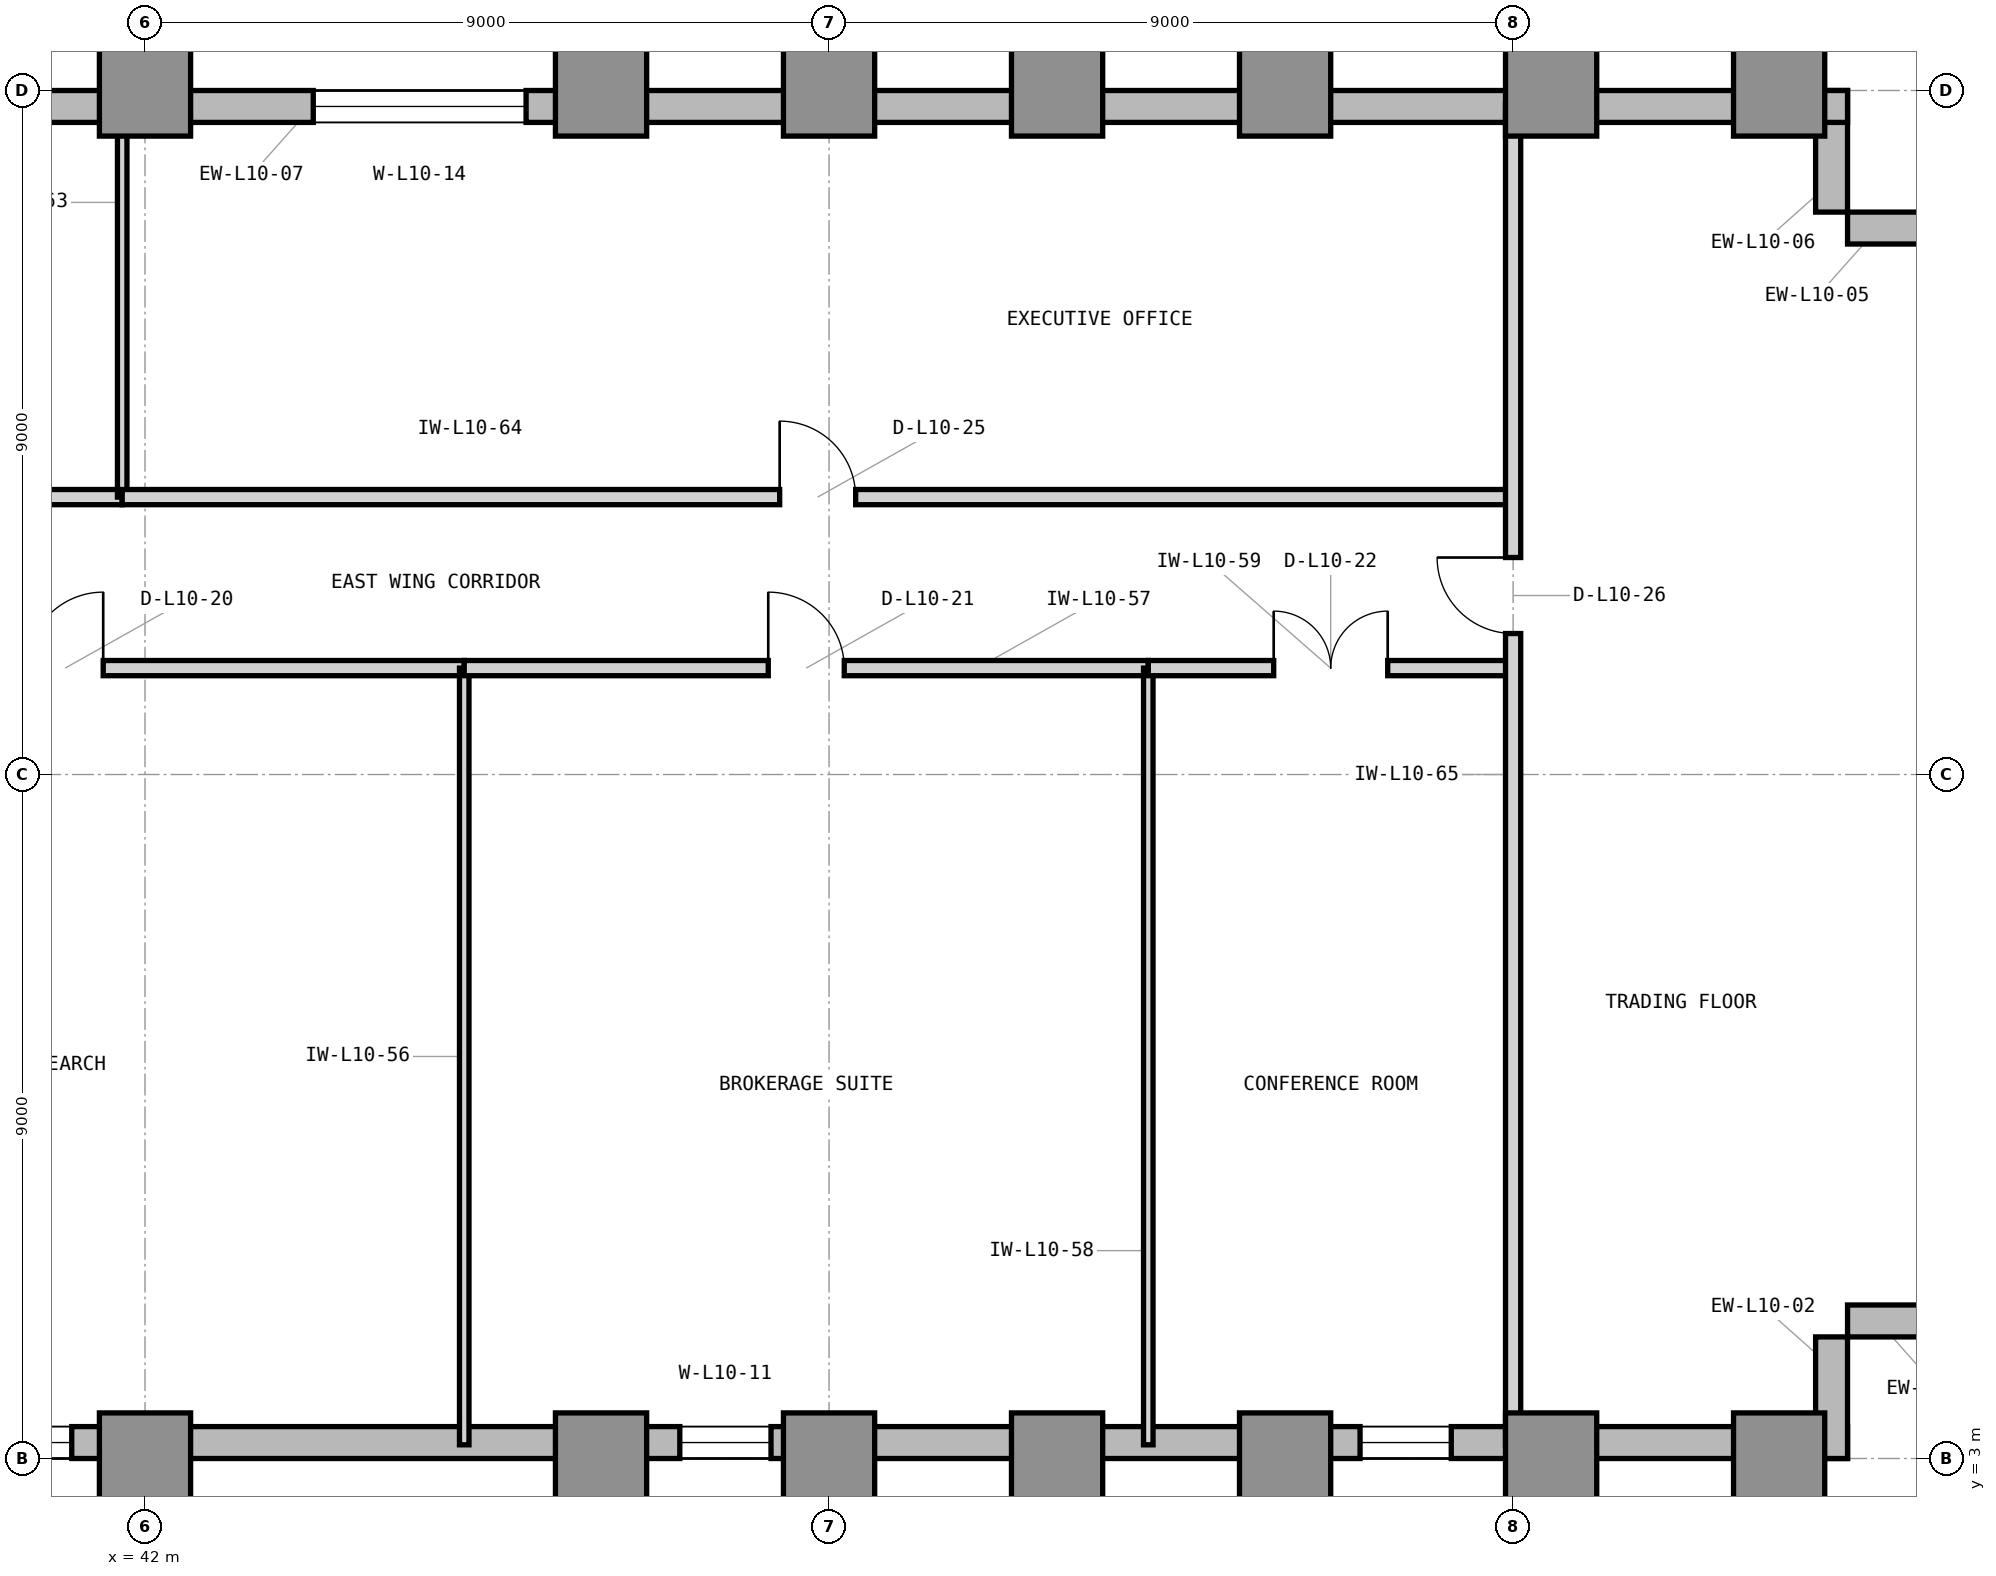
"""IFC4 building model, lengths in metres.
Left out: names, types, materials, properties, quantities, classifications, styles, units other than length and angle.
Written with IfcOpenShell. Run it as: python <this file> out.ifc"""

import sys

from ifc_helpers import new_model, si_unit, direction, frame, frame_2d, origin, origin_2d, place, context, subcontext, project, spatial, rectangle, extrude, element, fill, save


model = new_model("IFC4")
c1 = context("Model", 3, precision=1e-05, world=origin(), true_north=direction((0.0, 1.0)))
c2 = subcontext(c1, "Body", "Model", "MODEL_VIEW")
j1 = project(units=[si_unit("LENGTHUNIT", "METRE"), si_unit("PLANEANGLEUNIT", "RADIAN")], contexts=[c1])
p1 = place(None, origin())
s1 = spatial("IfcSite", under=j1, at=p1, CompositionType="ELEMENT")
p2 = place(p1, origin())
s2 = spatial("IfcBuilding", under=s1, at=p2, CompositionType="ELEMENT")
p3 = place(p2, frame((0.0, 0.0, 46.8)))
s3 = spatial("IfcBuildingStorey", under=s2, at=p3, CompositionType="ELEMENT", Elevation=46.8)
for number, where, z_axis, x_axis in (
    (1, (42.0, 3.0, 0.0), (0.0, 0.0, 1.0), (1.0, 0.0, 0.0)),
    (2, (42.0, 21.0, 0.0), (0.0, 0.0, 1.0), (1.0, 0.0, 0.0)),
    (3, (48.0, 3.0, 0.0), (0.0, 0.0, 1.0), (1.0, 0.0, 0.0)),
    (4, (48.0, 21.0, 0.0), (0.0, 0.0, 1.0), (1.0, 0.0, 0.0)),
    (5, (51.0, 3.0, 0.0), (0.0, 0.0, 1.0), (1.0, 0.0, 0.0)),
    (6, (51.0, 21.0, 0.0), (0.0, 0.0, 1.0), (1.0, 0.0, 0.0)),
    (7, (54.0, 3.0, 0.0), (0.0, 0.0, 1.0), (1.0, 0.0, 0.0)),
    (8, (54.0, 21.0, 0.0), (0.0, 0.0, 1.0), (1.0, 0.0, 0.0)),
    (9, (57.0, 3.0, 0.0), (0.0, 0.0, 1.0), (1.0, 0.0, 0.0)),
    (10, (57.0, 21.0, 0.0), (0.0, 0.0, 1.0), (1.0, 0.0, 0.0)),
    (11, (60.5, 3.0, 0.0), (0.0, 0.0, 1.0), (1.0, 0.0, 0.0)),
    (12, (60.5, 21.0, 0.0), (0.0, 0.0, 1.0), (1.0, 0.0, 0.0)),
    (13, (63.5, 3.0, 0.0), (0.0, 0.0, 1.0), (1.0, 0.0, 0.0)),
    (14, (63.5, 21.0, 0.0), (0.0, 0.0, 1.0), (1.0, 0.0, 0.0)),
):
    element("IfcColumn", number, at=place(p3, frame(where, z_axis=z_axis, x_axis=x_axis)), inside=s3, PredefinedType="COLUMN", context=c2, shape_type="SweptSolid", body=[
        extrude(rectangle(XDim=1.2, YDim=1.2, at=origin_2d()), origin(), (0.0, 0.0, 1.0), 4.2),
    ])
p4 = place(p3, frame((23.9, 3.21, 0.0), z_axis=(0.0, 0.0, 1.0), x_axis=(1.0, 0.0, 0.0)))
e15 = element("IfcWall", 15, at=p4, inside=s3, PredefinedType="STANDARD", context=c2, shape_type="SweptSolid", body=[
    extrude(rectangle(XDim=40.5, YDim=0.42, at=frame_2d((20.25, 0.0))), origin(), (0.0, 0.0, 1.0), 3.98),
])
p5 = place(p4, frame((1.1, 0.0, 0.85)))
e16 = element("IfcOpeningElement", 16, at=p5, cuts=e15, PredefinedType="OPENING", context=c2, shape_type="SweptSolid", body=[
    extrude(rectangle(XDim=1.2, YDim=2.45, at=frame_2d((0.6, 1.225))), frame((0.0, 0.22, 0.0), z_axis=(0.0, -1.0, 0.0), x_axis=(1.0, 0.0, 0.0)), (0.0, 0.0, 1.0), 0.44),
])
p6 = place(p4, frame((5.336, 0.0, 0.85)))
e17 = element("IfcOpeningElement", 17, at=p6, cuts=e15, PredefinedType="OPENING", context=c2, shape_type="SweptSolid", body=[
    extrude(rectangle(XDim=2.8, YDim=2.45, at=frame_2d((1.4, 1.225))), frame((0.0, 0.22, 0.0), z_axis=(0.0, -1.0, 0.0), x_axis=(1.0, 0.0, 0.0)), (0.0, 0.0, 1.0), 0.44),
])
p7 = place(p4, frame((14.336, 0.0, 0.85)))
e18 = element("IfcOpeningElement", 18, at=p7, cuts=e15, PredefinedType="OPENING", context=c2, shape_type="SweptSolid", body=[
    extrude(rectangle(XDim=2.8, YDim=2.45, at=frame_2d((1.4, 1.225))), frame((0.0, 0.22, 0.0), z_axis=(0.0, -1.0, 0.0), x_axis=(1.0, 0.0, 0.0)), (0.0, 0.0, 1.0), 0.44),
])
p8 = place(p4, frame((25.136, 0.0, 0.85)))
e19 = element("IfcOpeningElement", 19, at=p8, cuts=e15, PredefinedType="OPENING", context=c2, shape_type="SweptSolid", body=[
    extrude(rectangle(XDim=1.2, YDim=2.45, at=frame_2d((0.6, 1.225))), frame((0.0, 0.22, 0.0), z_axis=(0.0, -1.0, 0.0), x_axis=(1.0, 0.0, 0.0)), (0.0, 0.0, 1.0), 0.44),
])
p9 = place(p4, frame((34.086, 0.0, 0.85)))
e20 = element("IfcOpeningElement", 20, at=p9, cuts=e15, PredefinedType="OPENING", context=c2, shape_type="SweptSolid", body=[
    extrude(rectangle(XDim=1.2, YDim=2.45, at=frame_2d((0.6, 1.225))), frame((0.0, 0.22, 0.0), z_axis=(0.0, -1.0, 0.0), x_axis=(1.0, 0.0, 0.0)), (0.0, 0.0, 1.0), 0.44),
])
for number, where, z_axis, x_axis in (
    (21, (64.19, 3.0, 0.0), (0.0, 0.0, 1.0), (0.0, 1.0, 0.0)),
    (22, (64.4, 4.81, 0.0), (0.0, 0.0, 1.0), (1.0, 0.0, 0.0)),
    (23, (66.0, 19.19, 0.0), (0.0, 0.0, 1.0), (-1.0, 0.0, 0.0)),
    (24, (64.19, 19.4, 0.0), (0.0, 0.0, 1.0), (0.0, 1.0, 0.0)),
):
    element("IfcWall", number, at=place(p3, frame(where, z_axis=z_axis, x_axis=x_axis)), inside=s3, PredefinedType="STANDARD", context=c2, shape_type="SweptSolid", body=[
        extrude(rectangle(XDim=1.6, YDim=0.42, at=frame_2d((0.8, 0.0))), origin(), (0.0, 0.0, 1.0), 3.98),
    ])
p10 = place(p3, frame((64.4, 20.79, 0.0), z_axis=(0.0, 0.0, 1.0), x_axis=(-1.0, 0.0, 0.0)))
e25 = element("IfcWall", 25, at=p10, inside=s3, PredefinedType="STANDARD", context=c2, shape_type="SweptSolid", body=[
    extrude(rectangle(XDim=40.4, YDim=0.42, at=frame_2d((20.2, 0.0))), origin(), (0.0, 0.0, 1.0), 3.98),
])
p11 = place(p10, frame((26.375, 0.0, 0.85)))
e26 = element("IfcOpeningElement", 26, at=p11, cuts=e25, PredefinedType="OPENING", context=c2, shape_type="SweptSolid", body=[
    extrude(rectangle(XDim=2.8, YDim=2.45, at=frame_2d((1.4, 1.225))), frame((0.0, 0.22, 0.0), z_axis=(0.0, -1.0, 0.0), x_axis=(1.0, 0.0, 0.0)), (0.0, 0.0, 1.0), 0.44),
])
p12 = place(p10, frame((38.222, 0.0, 0.85)))
e27 = element("IfcOpeningElement", 27, at=p12, cuts=e25, PredefinedType="OPENING", context=c2, shape_type="SweptSolid", body=[
    extrude(rectangle(XDim=1.2, YDim=2.45, at=frame_2d((0.6, 1.225))), frame((0.0, 0.22, 0.0), z_axis=(0.0, -1.0, 0.0), x_axis=(1.0, 0.0, 0.0)), (0.0, 0.0, 1.0), 0.44),
])
p13 = place(p10, frame((32.536, 0.0, 0.85)))
e28 = element("IfcOpeningElement", 28, at=p13, cuts=e25, PredefinedType="OPENING", context=c2, shape_type="SweptSolid", body=[
    extrude(rectangle(XDim=2.8, YDim=2.45, at=frame_2d((1.4, 1.225))), frame((0.0, 0.22, 0.0), z_axis=(0.0, -1.0, 0.0), x_axis=(1.0, 0.0, 0.0)), (0.0, 0.0, 1.0), 0.44),
])
p14 = place(p10, frame((17.386, 0.0, 0.85)))
e29 = element("IfcOpeningElement", 29, at=p14, cuts=e25, PredefinedType="OPENING", context=c2, shape_type="SweptSolid", body=[
    extrude(rectangle(XDim=2.8, YDim=2.45, at=frame_2d((1.4, 1.225))), frame((0.0, 0.22, 0.0), z_axis=(0.0, -1.0, 0.0), x_axis=(1.0, 0.0, 0.0)), (0.0, 0.0, 1.0), 0.44),
])
p15 = place(p3, frame((35.7, 13.4, 0.0), z_axis=(0.0, 0.0, 1.0), x_axis=(1.0, 0.0, 0.0)))
e30 = element("IfcWall", 30, at=p15, inside=s3, PredefinedType="PARTITIONING", context=c2, shape_type="SweptSolid", body=[
    extrude(rectangle(XDim=10.5, YDim=0.2, at=frame_2d((5.25, 0.0))), origin(), (0.0, 0.0, 1.0), 3.97),
])
p16 = place(p15, frame((4.75, 0.0, 0.0)))
e31 = element("IfcOpeningElement", 31, at=p16, cuts=e30, PredefinedType="OPENING", context=c2, shape_type="SweptSolid", body=[
    extrude(rectangle(XDim=1.0, YDim=2.15, at=frame_2d((0.5, 1.075))), frame((0.0, 0.11, 0.0), z_axis=(0.0, -1.0, 0.0), x_axis=(1.0, 0.0, 0.0)), (0.0, 0.0, 1.0), 0.22),
])
p17 = place(p3, frame((46.2, 3.18, 0.0), z_axis=(0.0, 0.0, 1.0), x_axis=(0.0, 1.0, 0.0)))
e32 = element("IfcWall", 32, at=p17, inside=s3, PredefinedType="PARTITIONING", context=c2, shape_type="SweptSolid", body=[
    extrude(rectangle(XDim=10.22, YDim=0.125, at=frame_2d((5.11, 0.0))), origin(), (0.0, 0.0, 1.0), 3.97),
])
p18 = place(p3, frame((46.2, 13.4, 0.0), z_axis=(0.0, 0.0, 1.0), x_axis=(1.0, 0.0, 0.0)))
e33 = element("IfcWall", 33, at=p18, inside=s3, PredefinedType="PARTITIONING", context=c2, shape_type="SweptSolid", body=[
    extrude(rectangle(XDim=9.0, YDim=0.2, at=frame_2d((4.5, 0.0))), origin(), (0.0, 0.0, 1.0), 3.97),
])
p19 = place(p18, frame((4.0, 0.0, 0.0)))
e34 = element("IfcOpeningElement", 34, at=p19, cuts=e33, PredefinedType="OPENING", context=c2, shape_type="SweptSolid", body=[
    extrude(rectangle(XDim=1.0, YDim=2.15, at=frame_2d((0.5, 1.075))), frame((0.0, 0.11, 0.0), z_axis=(0.0, -1.0, 0.0), x_axis=(1.0, 0.0, 0.0)), (0.0, 0.0, 1.0), 0.22),
])
p20 = place(p3, frame((55.2, 3.18, 0.0), z_axis=(0.0, 0.0, 1.0), x_axis=(0.0, 1.0, 0.0)))
e35 = element("IfcWall", 35, at=p20, inside=s3, PredefinedType="PARTITIONING", context=c2, shape_type="SweptSolid", body=[
    extrude(rectangle(XDim=10.22, YDim=0.125, at=frame_2d((5.11, 0.0))), origin(), (0.0, 0.0, 1.0), 3.97),
])
p21 = place(p3, frame((55.2, 13.4, 0.0), z_axis=(0.0, 0.0, 1.0), x_axis=(1.0, 0.0, 0.0)))
e36 = element("IfcWall", 36, at=p21, inside=s3, PredefinedType="PARTITIONING", context=c2, shape_type="SweptSolid", body=[
    extrude(rectangle(XDim=4.8, YDim=0.2, at=frame_2d((2.4, 0.0))), origin(), (0.0, 0.0, 1.0), 3.97),
])
p22 = place(p21, frame((1.65, 0.0, 0.0)))
e37 = element("IfcOpeningElement", 37, at=p22, cuts=e36, PredefinedType="OPENING", context=c2, shape_type="SweptSolid", body=[
    extrude(rectangle(XDim=1.5, YDim=2.3, at=frame_2d((0.75, 1.15))), frame((0.0, 0.11, 0.0), z_axis=(0.0, -1.0, 0.0), x_axis=(1.0, 0.0, 0.0)), (0.0, 0.0, 1.0), 0.22),
])
p23 = place(p3, frame((34.2, 15.65, 0.0), z_axis=(0.0, 0.0, 1.0), x_axis=(1.0, 0.0, 0.0)))
e38 = element("IfcWall", 38, at=p23, inside=s3, PredefinedType="PARTITIONING", context=c2, shape_type="SweptSolid", body=[
    extrude(rectangle(XDim=7.5, YDim=0.2, at=frame_2d((3.75, 0.0))), origin(), (0.0, 0.0, 1.0), 3.97),
])
p24 = place(p23, frame((3.0, 0.0, 0.0)))
e39 = element("IfcOpeningElement", 39, at=p24, cuts=e38, PredefinedType="OPENING", context=c2, shape_type="SweptSolid", body=[
    extrude(rectangle(XDim=1.5, YDim=2.3, at=frame_2d((0.75, 1.15))), frame((0.0, 0.11, 0.0), z_axis=(0.0, -1.0, 0.0), x_axis=(1.0, 0.0, 0.0)), (0.0, 0.0, 1.0), 0.22),
])
p25 = place(p3, frame((41.7, 15.65, 0.0), z_axis=(0.0, 0.0, 1.0), x_axis=(0.0, 1.0, 0.0)))
e40 = element("IfcWall", 40, at=p25, inside=s3, PredefinedType="PARTITIONING", context=c2, shape_type="SweptSolid", body=[
    extrude(rectangle(XDim=5.17, YDim=0.125, at=frame_2d((2.585, 0.0))), origin(), (0.0, 0.0, 1.0), 3.97),
])
p26 = place(p3, frame((41.7, 15.65, 0.0), z_axis=(0.0, 0.0, 1.0), x_axis=(1.0, 0.0, 0.0)))
e41 = element("IfcWall", 41, at=p26, inside=s3, PredefinedType="PARTITIONING", context=c2, shape_type="SweptSolid", body=[
    extrude(rectangle(XDim=18.3, YDim=0.2, at=frame_2d((9.15, 0.0))), origin(), (0.0, 0.0, 1.0), 3.97),
])
p27 = place(p26, frame((8.65, 0.0, 0.0)))
e42 = element("IfcOpeningElement", 42, at=p27, cuts=e41, PredefinedType="OPENING", context=c2, shape_type="SweptSolid", body=[
    extrude(rectangle(XDim=1.0, YDim=2.15, at=frame_2d((0.5, 1.075))), frame((0.0, 0.11, 0.0), z_axis=(0.0, -1.0, 0.0), x_axis=(1.0, 0.0, 0.0)), (0.0, 0.0, 1.0), 0.22),
])
p28 = place(p3, frame((60.0, 3.18, 0.0), z_axis=(0.0, 0.0, 1.0), x_axis=(0.0, 1.0, 0.0)))
e43 = element("IfcWall", 43, at=p28, inside=s3, PredefinedType="PARTITIONING", context=c2, shape_type="SweptSolid", body=[
    extrude(rectangle(XDim=17.64, YDim=0.2, at=frame_2d((8.82, 0.0))), origin(), (0.0, 0.0, 1.0), 3.97),
])
p29 = place(p28, frame((10.675, 0.0, 0.0)))
e44 = element("IfcOpeningElement", 44, at=p29, cuts=e43, PredefinedType="OPENING", context=c2, shape_type="SweptSolid", body=[
    extrude(rectangle(XDim=1.0, YDim=2.15, at=frame_2d((0.5, 1.075))), frame((0.0, 0.11, 0.0), z_axis=(0.0, -1.0, 0.0), x_axis=(1.0, 0.0, 0.0)), (0.0, 0.0, 1.0), 0.22),
])
p30 = place(p16, origin())
e45 = element("IfcDoor", 45, at=p30, inside=s3, OperationType="SINGLE_SWING_RIGHT", PredefinedType="DOOR", context=c2, shape_type="SweptSolid", body=[
    extrude(rectangle(XDim=1.0, YDim=2.15, at=frame_2d((0.5, 1.075))), frame((0.0, 0.025, 0.0), z_axis=(0.0, -1.0, 0.0), x_axis=(1.0, 0.0, 0.0)), (0.0, 0.0, 1.0), 0.05),
])
fill(e31, e45)
p31 = place(p19, origin())
e46 = element("IfcDoor", 46, at=p31, inside=s3, OperationType="SINGLE_SWING_LEFT", PredefinedType="DOOR", context=c2, shape_type="SweptSolid", body=[
    extrude(rectangle(XDim=1.0, YDim=2.15, at=frame_2d((0.5, 1.075))), frame((0.0, 0.025, 0.0), z_axis=(0.0, -1.0, 0.0), x_axis=(1.0, 0.0, 0.0)), (0.0, 0.0, 1.0), 0.05),
])
fill(e34, e46)
p32 = place(p22, origin())
e47 = element("IfcDoor", 47, at=p32, inside=s3, OperationType="DOUBLE_DOOR_SINGLE_SWING", PredefinedType="DOOR", context=c2, shape_type="SweptSolid", body=[
    extrude(rectangle(XDim=1.5, YDim=2.3, at=frame_2d((0.75, 1.15))), frame((0.0, 0.025, 0.0), z_axis=(0.0, -1.0, 0.0), x_axis=(1.0, 0.0, 0.0)), (0.0, 0.0, 1.0), 0.05),
])
fill(e37, e47)
p33 = place(p27, origin())
e48 = element("IfcDoor", 48, at=p33, inside=s3, OperationType="SINGLE_SWING_LEFT", PredefinedType="DOOR", context=c2, shape_type="SweptSolid", body=[
    extrude(rectangle(XDim=1.0, YDim=2.15, at=frame_2d((0.5, 1.075))), frame((0.0, 0.025, 0.0), z_axis=(0.0, -1.0, 0.0), x_axis=(1.0, 0.0, 0.0)), (0.0, 0.0, 1.0), 0.05),
])
fill(e42, e48)
p34 = place(p29, origin())
e49 = element("IfcDoor", 49, at=p34, inside=s3, OperationType="SINGLE_SWING_RIGHT", PredefinedType="DOOR", context=c2, shape_type="SweptSolid", body=[
    extrude(rectangle(XDim=1.0, YDim=2.15, at=frame_2d((0.5, 1.075))), frame((0.0, 0.025, 0.0), z_axis=(0.0, -1.0, 0.0), x_axis=(1.0, 0.0, 0.0)), (0.0, 0.0, 1.0), 0.05),
])
fill(e44, e49)
p35 = place(p7, origin())
e50 = element("IfcWindow", 50, at=p35, inside=s3, PartitioningType="SINGLE_PANEL", PredefinedType="WINDOW", context=c2, shape_type="SweptSolid", body=[
    extrude(rectangle(XDim=2.8, YDim=2.45, at=frame_2d((1.4, 1.225))), frame((0.0, 0.11, 0.0), z_axis=(0.0, -1.0, 0.0), x_axis=(1.0, 0.0, 0.0)), (0.0, 0.0, 1.0), 0.06),
])
fill(e18, e50)
p36 = place(p8, origin())
e51 = element("IfcWindow", 51, at=p36, inside=s3, PartitioningType="SINGLE_PANEL", PredefinedType="WINDOW", context=c2, shape_type="SweptSolid", body=[
    extrude(rectangle(XDim=1.2, YDim=2.45, at=frame_2d((0.6, 1.225))), frame((0.0, 0.11, 0.0), z_axis=(0.0, -1.0, 0.0), x_axis=(1.0, 0.0, 0.0)), (0.0, 0.0, 1.0), 0.06),
])
fill(e19, e51)
p37 = place(p9, origin())
e52 = element("IfcWindow", 52, at=p37, inside=s3, PartitioningType="SINGLE_PANEL", PredefinedType="WINDOW", context=c2, shape_type="SweptSolid", body=[
    extrude(rectangle(XDim=1.2, YDim=2.45, at=frame_2d((0.6, 1.225))), frame((0.0, 0.11, 0.0), z_axis=(0.0, -1.0, 0.0), x_axis=(1.0, 0.0, 0.0)), (0.0, 0.0, 1.0), 0.06),
])
fill(e20, e52)
p38 = place(p14, origin())
e53 = element("IfcWindow", 53, at=p38, inside=s3, PartitioningType="SINGLE_PANEL", PredefinedType="WINDOW", context=c2, shape_type="SweptSolid", body=[
    extrude(rectangle(XDim=2.8, YDim=2.45, at=frame_2d((1.4, 1.225))), frame((0.0, 0.11, 0.0), z_axis=(0.0, -1.0, 0.0), x_axis=(1.0, 0.0, 0.0)), (0.0, 0.0, 1.0), 0.06),
])
fill(e29, e53)
save(model, sys.argv[1])
